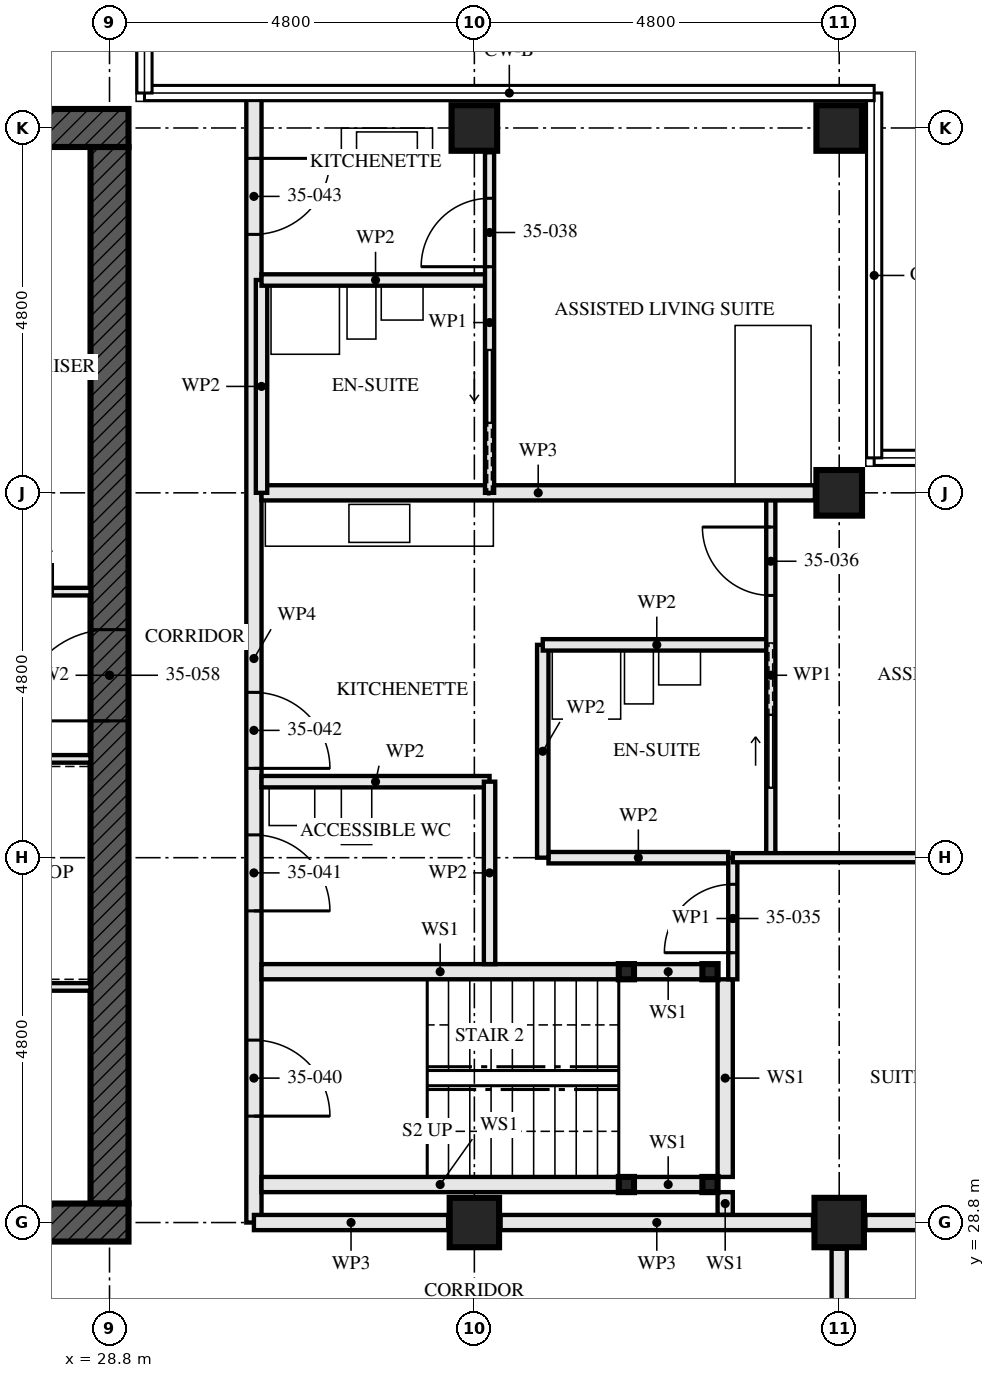
"""IFC4 building model, lengths in metres.
Left out: names, types, materials, properties, quantities, classifications, styles, units other than length and angle.
Written with IfcOpenShell. Run it as: python <this file> out.ifc"""

import sys

from ifc_helpers import new_model, si_unit, direction, frame, frame_2d, origin, origin_2d, place, context, subcontext, project, spatial, rectangle, hollow_rectangle, extrude, element, fill, save


model = new_model("IFC4")
c1 = context("Model", 3, precision=1e-05, world=origin(), true_north=direction((0.0, 1.0)))
c2 = subcontext(c1, "Body", "Model", "MODEL_VIEW")
j1 = project(units=[si_unit("LENGTHUNIT", "METRE"), si_unit("PLANEANGLEUNIT", "RADIAN")], contexts=[c1])
p1 = place(None, origin())
s1 = spatial("IfcSite", under=j1, at=p1, CompositionType="ELEMENT")
p2 = place(p1, origin())
s2 = spatial("IfcBuilding", under=s1, at=p2, CompositionType="ELEMENT")
p3 = place(p2, frame((0.0, 0.0, 129.5)))
s3 = spatial("IfcBuildingStorey", under=s2, at=p3, CompositionType="ELEMENT", Elevation=129.5)
p4 = place(p3, frame((33.6, 28.8, 0.0), z_axis=(0.0, 0.0, 1.0), x_axis=(0.0, 1.0, 0.0)))
e1 = element("IfcColumn", 1, at=p4, inside=s3, PredefinedType="COLUMN", context=c2, shape_type="SweptSolid", body=[
    extrude(hollow_rectangle(XDim=0.65, YDim=0.65, WallThickness=0.05, at=origin_2d()), origin(), (0.0, 0.0, 1.0), 3.5),
])
p5 = place(p3, frame((33.6, 43.2, 0.0), z_axis=(0.0, 0.0, 1.0), x_axis=(0.0, 1.0, 0.0)))
e2 = element("IfcColumn", 2, at=p5, inside=s3, PredefinedType="COLUMN", context=c2, shape_type="SweptSolid", body=[
    extrude(hollow_rectangle(XDim=0.6, YDim=0.6, WallThickness=0.08, at=origin_2d()), origin(), (0.0, 0.0, 1.0), 3.5),
])
p6 = place(p3, frame((38.4, 28.8, 0.0), z_axis=(0.0, 0.0, 1.0), x_axis=(0.0, 1.0, 0.0)))
e3 = element("IfcColumn", 3, at=p6, inside=s3, PredefinedType="COLUMN", context=c2, shape_type="SweptSolid", body=[
    extrude(hollow_rectangle(XDim=0.65, YDim=0.65, WallThickness=0.05, at=origin_2d()), origin(), (0.0, 0.0, 1.0), 3.5),
])
for number, where, z_axis, x_axis in (
    (4, (38.4, 38.4, 0.0), (0.0, 0.0, 1.0), (0.0, 1.0, 0.0)),
    (5, (38.4, 43.2, 0.0), (0.0, 0.0, 1.0), (0.0, 1.0, 0.0)),
):
    element("IfcColumn", number, at=place(p3, frame(where, z_axis=z_axis, x_axis=x_axis)), inside=s3, PredefinedType="COLUMN", context=c2, shape_type="SweptSolid", body=[
        extrude(hollow_rectangle(XDim=0.6, YDim=0.6, WallThickness=0.08, at=origin_2d()), origin(), (0.0, 0.0, 1.0), 3.5),
    ])
p7 = place(p3, frame((14.15, 28.8, -0.17), z_axis=(0.0, 0.0, 1.0), x_axis=(1.0, 0.0, 0.0)))
e6 = element("IfcWall", 6, at=p7, inside=s3, PredefinedType="SHEAR", context=c2, shape_type="SweptSolid", body=[
    extrude(rectangle(XDim=14.9, YDim=0.5, at=frame_2d((7.45, 0.0))), origin(), (0.0, 0.0, 1.0), 3.5),
])
p8 = place(p7, frame((6.85, 0.0, 0.17)))
e7 = element("IfcOpeningElement", 7, at=p8, cuts=e6, PredefinedType="OPENING", context=c2, shape_type="SweptSolid", body=[
    extrude(rectangle(XDim=1.2, YDim=2.1, at=frame_2d((0.6, 1.05))), frame((0.0, 0.26, 0.0), z_axis=(0.0, -1.0, 0.0), x_axis=(1.0, 0.0, 0.0)), (0.0, 0.0, 1.0), 0.521),
])
p9 = place(p3, frame((29.05, 43.2, -0.17), z_axis=(0.0, 0.0, 1.0), x_axis=(-1.0, 0.0, 0.0)))
e8 = element("IfcWall", 8, at=p9, inside=s3, PredefinedType="SHEAR", context=c2, shape_type="SweptSolid", body=[
    extrude(rectangle(XDim=14.9, YDim=0.5, at=frame_2d((7.45, 0.0))), origin(), (0.0, 0.0, 1.0), 3.5),
])
p10 = place(p9, frame((6.85, 0.0, 0.17)))
e9 = element("IfcOpeningElement", 9, at=p10, cuts=e8, PredefinedType="OPENING", context=c2, shape_type="SweptSolid", body=[
    extrude(rectangle(XDim=1.2, YDim=2.1, at=frame_2d((0.6, 1.05))), frame((0.0, 0.26, 0.0), z_axis=(0.0, -1.0, 0.0), x_axis=(1.0, 0.0, 0.0)), (0.0, 0.0, 1.0), 0.521),
])
p11 = place(p3, frame((28.8, 29.05, -0.17), z_axis=(0.0, 0.0, 1.0), x_axis=(0.0, 1.0, 0.0)))
e10 = element("IfcWall", 10, at=p11, inside=s3, PredefinedType="SHEAR", context=c2, shape_type="SweptSolid", body=[
    extrude(rectangle(XDim=13.9, YDim=0.5, at=frame_2d((6.95, 0.0))), origin(), (0.0, 0.0, 1.0), 3.5),
])
p12 = place(p11, frame((6.35, 0.0, 0.17)))
e11 = element("IfcOpeningElement", 11, at=p12, cuts=e10, PredefinedType="OPENING", context=c2, shape_type="SweptSolid", body=[
    extrude(rectangle(XDim=1.2, YDim=2.1, at=frame_2d((0.6, 1.05))), frame((0.0, 0.26, 0.0), z_axis=(0.0, -1.0, 0.0), x_axis=(1.0, 0.0, 0.0)), (0.0, 0.0, 1.0), 0.521),
])
for number, where, z_axis, x_axis in (
    (12, (36.7, 29.3, 0.0), (0.0, 0.0, 1.0), (1.0, 0.0, 0.0)),
    (13, (36.7, 32.1, 0.0), (0.0, 0.0, 1.0), (1.0, 0.0, 0.0)),
    (14, (35.6, 29.3, 0.0), (0.0, 0.0, 1.0), (1.0, 0.0, 0.0)),
    (15, (35.6, 32.1, 0.0), (0.0, 0.0, 1.0), (1.0, 0.0, 0.0)),
):
    element("IfcColumn", number, at=place(p3, frame(where, z_axis=z_axis, x_axis=x_axis)), inside=s3, PredefinedType="COLUMN", context=c2, shape_type="SweptSolid", body=[
        extrude(hollow_rectangle(XDim=0.2, YDim=0.2, WallThickness=0.008, at=origin_2d()), origin(), (0.0, 0.0, 1.0), 3.33),
    ])
p13 = place(p3, frame((38.4, 26.8, 0.0), z_axis=(0.0, 0.0, 1.0), x_axis=(0.0, 1.0, 0.0)))
e16 = element("IfcWall", 16, at=p13, inside=s3, PredefinedType="PARTITIONING", context=c2, shape_type="SweptSolid", body=[
    extrude(rectangle(XDim=1.655, YDim=0.2, at=frame_2d((0.828, 0.0))), origin(), (0.0, 0.0, 1.0), 3.33),
])
p14 = place(p3, frame((36.6, 29.3, 0.0), z_axis=(0.0, 0.0, 1.0), x_axis=(-1.0, 0.0, 0.0)))
e17 = element("IfcWall", 17, at=p14, inside=s3, PredefinedType="SOLIDWALL", context=c2, shape_type="SweptSolid", body=[
    extrude(rectangle(XDim=0.9, YDim=0.2, at=frame_2d((0.45, 0.0))), origin(), (0.0, 0.0, 1.0), 2.99),
])
p15 = place(p3, frame((35.5, 29.3, 0.0), z_axis=(0.0, 0.0, 1.0), x_axis=(-1.0, 0.0, 0.0)))
e18 = element("IfcWall", 18, at=p15, inside=s3, PredefinedType="SOLIDWALL", context=c2, shape_type="SweptSolid", body=[
    extrude(rectangle(XDim=4.7, YDim=0.2, at=frame_2d((2.35, 0.0))), origin(), (0.0, 0.0, 1.0), 2.99),
])
p16 = place(p3, frame((36.6, 32.1, 0.0), z_axis=(0.0, 0.0, 1.0), x_axis=(-1.0, 0.0, 0.0)))
e19 = element("IfcWall", 19, at=p16, inside=s3, PredefinedType="SOLIDWALL", context=c2, shape_type="SweptSolid", body=[
    extrude(rectangle(XDim=0.9, YDim=0.2, at=frame_2d((0.45, 0.0))), origin(), (0.0, 0.0, 1.0), 2.99),
])
p17 = place(p3, frame((35.5, 32.1, 0.0), z_axis=(0.0, 0.0, 1.0), x_axis=(-1.0, 0.0, 0.0)))
e20 = element("IfcWall", 20, at=p17, inside=s3, PredefinedType="SOLIDWALL", context=c2, shape_type="SweptSolid", body=[
    extrude(rectangle(XDim=4.7, YDim=0.2, at=frame_2d((2.35, 0.0))), origin(), (0.0, 0.0, 1.0), 2.99),
])
p18 = place(p3, frame((36.9, 28.9, 0.0), z_axis=(0.0, 0.0, 1.0), x_axis=(0.0, 1.0, 0.0)))
e21 = element("IfcWall", 21, at=p18, inside=s3, PredefinedType="SOLIDWALL", context=c2, shape_type="SweptSolid", body=[
    extrude(rectangle(XDim=0.3, YDim=0.2, at=frame_2d((0.15, 0.0))), origin(), (0.0, 0.0, 1.0), 3.33),
])
p19 = place(p3, frame((36.9, 29.4, 0.0), z_axis=(0.0, 0.0, 1.0), x_axis=(0.0, 1.0, 0.0)))
e22 = element("IfcWall", 22, at=p19, inside=s3, PredefinedType="SOLIDWALL", context=c2, shape_type="SweptSolid", body=[
    extrude(rectangle(XDim=2.6, YDim=0.2, at=frame_2d((1.3, 0.0))), origin(), (0.0, 0.0, 1.0), 3.33),
])
p20 = place(p3, frame((33.8, 32.2, 0.0), z_axis=(0.0, 0.0, 1.0), x_axis=(0.0, 1.0, 0.0)))
e23 = element("IfcWall", 23, at=p20, inside=s3, PredefinedType="PARTITIONING", context=c2, shape_type="SweptSolid", body=[
    extrude(rectangle(XDim=2.4, YDim=0.15, at=frame_2d((1.2, 0.0))), origin(), (0.0, 0.0, 1.0), 2.55),
])
for number, where, z_axis, x_axis in (
    (24, (33.8, 34.6, 0.0), (0.0, 0.0, 1.0), (-1.0, 0.0, 0.0)),
    (25, (37.5, 36.4, 0.0), (0.0, 0.0, 1.0), (-1.0, 0.0, 0.0)),
):
    element("IfcWall", number, at=place(p3, frame(where, z_axis=z_axis, x_axis=x_axis)), inside=s3, PredefinedType="PARTITIONING", context=c2, shape_type="SweptSolid", body=[
        extrude(rectangle(XDim=3.0, YDim=0.15, at=frame_2d((1.5, 0.0))), origin(), (0.0, 0.0, 1.0), 3.33),
    ])
p21 = place(p3, frame((34.5, 33.6, 0.0), z_axis=(0.0, 0.0, 1.0), x_axis=(0.0, 1.0, 0.0)))
e26 = element("IfcWall", 26, at=p21, inside=s3, PredefinedType="PARTITIONING", context=c2, shape_type="SweptSolid", body=[
    extrude(rectangle(XDim=2.8, YDim=0.15, at=frame_2d((1.4, 0.0))), origin(), (0.0, 0.0, 1.0), 3.33),
])
p22 = place(p3, frame((37.0, 32.0, 0.0), z_axis=(0.0, 0.0, 1.0), x_axis=(0.0, 1.0, 0.0)))
e27 = element("IfcWall", 27, at=p22, inside=s3, PredefinedType="PARTITIONING", context=c2, shape_type="SweptSolid", body=[
    extrude(rectangle(XDim=1.6, YDim=0.12, at=frame_2d((0.8, 0.0))), origin(), (0.0, 0.0, 1.0), 3.33),
])
p23 = place(p22, frame((0.35, 0.0, 0.0)))
e28 = element("IfcOpeningElement", 28, at=p23, cuts=e27, PredefinedType="OPENING", context=c2, shape_type="SweptSolid", body=[
    extrude(rectangle(XDim=0.9, YDim=2.1, at=frame_2d((0.45, 1.05))), frame((0.0, 0.071, 0.0), z_axis=(0.0, -1.0, 0.0), x_axis=(1.0, 0.0, 0.0)), (0.0, 0.0, 1.0), 0.141),
])
p24 = place(p3, frame((37.5, 33.6, 0.0), z_axis=(0.0, 0.0, 1.0), x_axis=(0.0, 1.0, 0.0)))
e29 = element("IfcWall", 29, at=p24, inside=s3, PredefinedType="PARTITIONING", context=c2, shape_type="SweptSolid", body=[
    extrude(rectangle(XDim=4.8, YDim=0.12, at=frame_2d((2.4, 0.0))), origin(), (0.0, 0.0, 1.0), 3.33),
])
p25 = place(p24, frame((3.45, 0.0, 0.0)))
e30 = element("IfcOpeningElement", 30, at=p25, cuts=e29, PredefinedType="OPENING", context=c2, shape_type="SweptSolid", body=[
    extrude(rectangle(XDim=0.9, YDim=2.1, at=frame_2d((0.45, 1.05))), frame((0.0, 0.071, 0.0), z_axis=(0.0, -1.0, 0.0), x_axis=(1.0, 0.0, 0.0)), (0.0, 0.0, 1.0), 0.141),
])
p26 = place(p24, frame((0.925, 0.0, 0.0)))
e31 = element("IfcOpeningElement", 31, at=p26, cuts=e29, PredefinedType="OPENING", context=c2, shape_type="SweptSolid", body=[
    extrude(rectangle(XDim=0.95, YDim=2.1, at=frame_2d((0.475, 1.05))), frame((0.0, 0.071, 0.0), z_axis=(0.0, -1.0, 0.0), x_axis=(1.0, 0.0, 0.0)), (0.0, 0.0, 1.0), 0.141),
])
p27 = place(p3, frame((42.88, 33.6, 0.0), z_axis=(0.0, 0.0, 1.0), x_axis=(-1.0, 0.0, 0.0)))
e32 = element("IfcWall", 32, at=p27, inside=s3, PredefinedType="PARTITIONING", context=c2, shape_type="SweptSolid", body=[
    extrude(rectangle(XDim=5.88, YDim=0.12, at=frame_2d((2.94, 0.0))), origin(), (0.0, 0.0, 1.0), 2.55),
])
p28 = place(p3, frame((38.08, 38.4, 0.0), z_axis=(0.0, 0.0, 1.0), x_axis=(-1.0, 0.0, 0.0)))
e33 = element("IfcWall", 33, at=p28, inside=s3, PredefinedType="PARTITIONING", context=c2, shape_type="SweptSolid", body=[
    extrude(rectangle(XDim=7.28, YDim=0.2, at=frame_2d((3.64, 0.0))), origin(), (0.0, 0.0, 1.0), 2.55),
])
p29 = place(p3, frame((33.8, 41.2, 0.0), z_axis=(0.0, 0.0, 1.0), x_axis=(-1.0, 0.0, 0.0)))
e34 = element("IfcWall", 34, at=p29, inside=s3, PredefinedType="PARTITIONING", context=c2, shape_type="SweptSolid", body=[
    extrude(rectangle(XDim=3.0, YDim=0.15, at=frame_2d((1.5, 0.0))), origin(), (0.0, 0.0, 1.0), 3.33),
])
p30 = place(p3, frame((30.8, 38.4, 0.0), z_axis=(0.0, 0.0, 1.0), x_axis=(0.0, 1.0, 0.0)))
e35 = element("IfcWall", 35, at=p30, inside=s3, PredefinedType="PARTITIONING", context=c2, shape_type="SweptSolid", body=[
    extrude(rectangle(XDim=2.8, YDim=0.15, at=frame_2d((1.4, 0.0))), origin(), (0.0, 0.0, 1.0), 3.33),
])
p31 = place(p3, frame((33.8, 38.4, 0.0), z_axis=(0.0, 0.0, 1.0), x_axis=(0.0, 1.0, 0.0)))
e36 = element("IfcWall", 36, at=p31, inside=s3, PredefinedType="PARTITIONING", context=c2, shape_type="SweptSolid", body=[
    extrude(rectangle(XDim=4.48, YDim=0.12, at=frame_2d((2.24, 0.0))), origin(), (0.0, 0.0, 1.0), 3.33),
])
p32 = place(p31, frame((2.975, 0.0, 0.0)))
e37 = element("IfcOpeningElement", 37, at=p32, cuts=e36, PredefinedType="OPENING", context=c2, shape_type="SweptSolid", body=[
    extrude(rectangle(XDim=0.9, YDim=2.1, at=frame_2d((0.45, 1.05))), frame((0.0, 0.071, 0.0), z_axis=(0.0, -1.0, 0.0), x_axis=(1.0, 0.0, 0.0)), (0.0, 0.0, 1.0), 0.141),
])
p33 = place(p31, frame((0.925, 0.0, 0.0)))
e38 = element("IfcOpeningElement", 38, at=p33, cuts=e36, PredefinedType="OPENING", context=c2, shape_type="SweptSolid", body=[
    extrude(rectangle(XDim=0.95, YDim=2.1, at=frame_2d((0.475, 1.05))), frame((0.0, 0.071, 0.0), z_axis=(0.0, -1.0, 0.0), x_axis=(1.0, 0.0, 0.0)), (0.0, 0.0, 1.0), 0.141),
])
p34 = place(p3, frame((30.7, 28.8, 0.0), z_axis=(0.0, 0.0, 1.0), x_axis=(0.0, 1.0, 0.0)))
e39 = element("IfcWall", 39, at=p34, inside=s3, PredefinedType="PARTITIONING", context=c2, shape_type="SweptSolid", body=[
    extrude(rectangle(XDim=14.84, YDim=0.2, at=frame_2d((7.42, 0.0))), origin(), (0.0, 0.0, 1.0), 2.32),
])
p35 = place(p34, frame((1.4, 0.0, 0.0)))
e40 = element("IfcOpeningElement", 40, at=p35, cuts=e39, PredefinedType="OPENING", context=c2, shape_type="SweptSolid", body=[
    extrude(rectangle(XDim=1.0, YDim=2.1, at=frame_2d((0.5, 1.05))), frame((0.0, 0.111, 0.0), z_axis=(0.0, -1.0, 0.0), x_axis=(1.0, 0.0, 0.0)), (0.0, 0.0, 1.0), 0.221),
])
p36 = place(p34, frame((4.1, 0.0, 0.0)))
e41 = element("IfcOpeningElement", 41, at=p36, cuts=e39, PredefinedType="OPENING", context=c2, shape_type="SweptSolid", body=[
    extrude(rectangle(XDim=1.0, YDim=2.1, at=frame_2d((0.5, 1.05))), frame((0.0, 0.111, 0.0), z_axis=(0.0, -1.0, 0.0), x_axis=(1.0, 0.0, 0.0)), (0.0, 0.0, 1.0), 0.221),
])
p37 = place(p34, frame((5.975, 0.0, 0.0)))
e42 = element("IfcOpeningElement", 42, at=p37, cuts=e39, PredefinedType="OPENING", context=c2, shape_type="SweptSolid", body=[
    extrude(rectangle(XDim=1.0, YDim=2.1, at=frame_2d((0.5, 1.05))), frame((0.0, 0.111, 0.0), z_axis=(0.0, -1.0, 0.0), x_axis=(1.0, 0.0, 0.0)), (0.0, 0.0, 1.0), 0.221),
])
p38 = place(p34, frame((13.0, 0.0, 0.0)))
e43 = element("IfcOpeningElement", 43, at=p38, cuts=e39, PredefinedType="OPENING", context=c2, shape_type="SweptSolid", body=[
    extrude(rectangle(XDim=1.0, YDim=2.1, at=frame_2d((0.5, 1.05))), frame((0.0, 0.111, 0.0), z_axis=(0.0, -1.0, 0.0), x_axis=(1.0, 0.0, 0.0)), (0.0, 0.0, 1.0), 0.221),
])
p39 = place(p3, frame((23.05, 34.9, 0.0), z_axis=(0.0, 0.0, 1.0), x_axis=(1.0, 0.0, 0.0)))
e44 = element("IfcWall", 44, at=p39, inside=s3, PredefinedType="SOLIDWALL", context=c2, shape_type="SweptSolid", body=[
    extrude(rectangle(XDim=5.5, YDim=0.1, at=frame_2d((2.75, 0.0))), origin(), (0.0, 0.0, 1.0), 3.33),
])
p40 = place(p3, frame((22.65, 37.1, 0.0), z_axis=(0.0, 0.0, 1.0), x_axis=(1.0, 0.0, 0.0)))
e45 = element("IfcWall", 45, at=p40, inside=s3, PredefinedType="SOLIDWALL", context=c2, shape_type="SweptSolid", body=[
    extrude(rectangle(XDim=5.9, YDim=0.1, at=frame_2d((2.95, 0.0))), origin(), (0.0, 0.0, 1.0), 3.33),
])
p41 = place(p40, frame((3.15, 0.0, 0.0)))
e46 = element("IfcOpeningElement", 46, at=p41, cuts=e45, PredefinedType="OPENING", context=c2, shape_type="SweptSolid", body=[
    extrude(rectangle(XDim=0.9, YDim=2.1, at=frame_2d((0.45, 1.05))), frame((0.0, 0.061, 0.0), z_axis=(0.0, -1.0, 0.0), x_axis=(1.0, 0.0, 0.0)), (0.0, 0.0, 1.0), 0.121),
])
p42 = place(p40, frame((4.7, 0.0, 0.0)))
e47 = element("IfcOpeningElement", 47, at=p42, cuts=e45, PredefinedType="OPENING", context=c2, shape_type="SweptSolid", body=[
    extrude(rectangle(XDim=0.7, YDim=2.1, at=frame_2d((0.35, 1.05))), frame((0.0, 0.061, 0.0), z_axis=(0.0, -1.0, 0.0), x_axis=(1.0, 0.0, 0.0)), (0.0, 0.0, 1.0), 0.121),
])
p43 = place(p3, frame((23.15, 31.9, 0.0), z_axis=(0.0, 0.0, 1.0), x_axis=(1.0, 0.0, 0.0)))
e48 = element("IfcWall", 48, at=p43, inside=s3, PredefinedType="SOLIDWALL", context=c2, shape_type="SweptSolid", body=[
    extrude(rectangle(XDim=5.4, YDim=0.1, at=frame_2d((2.7, 0.0))), origin(), (0.0, 0.0, 1.0), 3.33),
])
p44 = place(p3, frame((42.88, 28.8, 0.0), z_axis=(0.0, 0.0, 1.0), x_axis=(-1.0, 0.0, 0.0)))
e49 = element("IfcWall", 49, at=p44, inside=s3, PredefinedType="PARTITIONING", context=c2, shape_type="SweptSolid", body=[
    extrude(rectangle(XDim=4.135, YDim=0.2, at=frame_2d((2.067, 0.0))), origin(), (0.0, 0.0, 1.0), 2.32),
])
p45 = place(p3, frame((38.055, 28.8, 0.0), z_axis=(0.0, 0.0, 1.0), x_axis=(-1.0, 0.0, 0.0)))
e50 = element("IfcWall", 50, at=p45, inside=s3, PredefinedType="PARTITIONING", context=c2, shape_type="SweptSolid", body=[
    extrude(rectangle(XDim=4.11, YDim=0.2, at=frame_2d((2.055, 0.0))), origin(), (0.0, 0.0, 1.0), 2.32),
])
p46 = place(p3, frame((33.255, 28.8, 0.0), z_axis=(0.0, 0.0, 1.0), x_axis=(-1.0, 0.0, 0.0)))
e51 = element("IfcWall", 51, at=p46, inside=s3, PredefinedType="PARTITIONING", context=c2, shape_type="SweptSolid", body=[
    extrude(rectangle(XDim=2.555, YDim=0.2, at=frame_2d((1.277, 0.0))), origin(), (0.0, 0.0, 1.0), 2.32),
])
p47 = place(p3, frame((36.94, 33.6, 0.0), z_axis=(0.0, 0.0, 1.0), x_axis=(-1.0, 0.0, 0.0)))
e52 = element("IfcWall", 52, at=p47, inside=s3, PredefinedType="PARTITIONING", context=c2, shape_type="SweptSolid", body=[
    extrude(rectangle(XDim=2.365, YDim=0.15, at=frame_2d((1.183, 0.0))), origin(), (0.0, 0.0, 1.0), 2.55),
])
p48 = place(p23, origin())
e53 = element("IfcDoor", 53, at=p48, inside=s3, OperationType="SINGLE_SWING_RIGHT", PredefinedType="DOOR", context=c2, shape_type="SweptSolid", body=[
    extrude(rectangle(XDim=0.9, YDim=2.1, at=frame_2d((0.45, 1.05))), frame((0.0, 0.022, 0.0), z_axis=(0.0, -1.0, 0.0), x_axis=(1.0, 0.0, 0.0)), (0.0, 0.0, 1.0), 0.044),
])
fill(e28, e53)
p49 = place(p25, origin())
e54 = element("IfcDoor", 54, at=p49, inside=s3, OperationType="SINGLE_SWING_LEFT", PredefinedType="DOOR", context=c2, shape_type="SweptSolid", body=[
    extrude(rectangle(XDim=0.9, YDim=2.1, at=frame_2d((0.45, 1.05))), frame((0.0, 0.022, 0.0), z_axis=(0.0, -1.0, 0.0), x_axis=(1.0, 0.0, 0.0)), (0.0, 0.0, 1.0), 0.044),
])
fill(e30, e54)
p50 = place(p26, origin())
e55 = element("IfcDoor", 55, at=p50, inside=s3, OperationType="SLIDING_TO_LEFT", PredefinedType="DOOR", context=c2, shape_type="SweptSolid", body=[
    extrude(rectangle(XDim=0.95, YDim=2.1, at=frame_2d((0.475, 1.05))), frame((0.0, 0.022, 0.0), z_axis=(0.0, -1.0, 0.0), x_axis=(1.0, 0.0, 0.0)), (0.0, 0.0, 1.0), 0.044),
])
fill(e31, e55)
p51 = place(p32, origin())
e56 = element("IfcDoor", 56, at=p51, inside=s3, OperationType="SINGLE_SWING_RIGHT", PredefinedType="DOOR", context=c2, shape_type="SweptSolid", body=[
    extrude(rectangle(XDim=0.9, YDim=2.1, at=frame_2d((0.45, 1.05))), frame((0.0, 0.022, 0.0), z_axis=(0.0, -1.0, 0.0), x_axis=(1.0, 0.0, 0.0)), (0.0, 0.0, 1.0), 0.044),
])
fill(e37, e56)
p52 = place(p33, origin())
e57 = element("IfcDoor", 57, at=p52, inside=s3, OperationType="SLIDING_TO_RIGHT", PredefinedType="DOOR", context=c2, shape_type="SweptSolid", body=[
    extrude(rectangle(XDim=0.95, YDim=2.1, at=frame_2d((0.475, 1.05))), frame((0.0, 0.022, 0.0), z_axis=(0.0, -1.0, 0.0), x_axis=(1.0, 0.0, 0.0)), (0.0, 0.0, 1.0), 0.044),
])
fill(e38, e57)
p53 = place(p35, frame((1.0, 0.0, 0.0), z_axis=(0.0, 0.0, 1.0), x_axis=(-1.0, 0.0, 0.0)))
e58 = element("IfcDoor", 58, at=p53, inside=s3, OperationType="SINGLE_SWING_LEFT", PredefinedType="DOOR", context=c2, shape_type="SweptSolid", body=[
    extrude(rectangle(XDim=1.0, YDim=2.1, at=frame_2d((0.5, 1.05))), frame((0.0, 0.032, 0.0), z_axis=(0.0, -1.0, 0.0), x_axis=(1.0, 0.0, 0.0)), (0.0, 0.0, 1.0), 0.064),
])
fill(e40, e58)
p54 = place(p36, frame((1.0, 0.0, 0.0), z_axis=(0.0, 0.0, 1.0), x_axis=(-1.0, 0.0, 0.0)))
e59 = element("IfcDoor", 59, at=p54, inside=s3, OperationType="SINGLE_SWING_LEFT", PredefinedType="DOOR", context=c2, shape_type="SweptSolid", body=[
    extrude(rectangle(XDim=1.0, YDim=2.1, at=frame_2d((0.5, 1.05))), frame((0.0, 0.027, 0.0), z_axis=(0.0, -1.0, 0.0), x_axis=(1.0, 0.0, 0.0)), (0.0, 0.0, 1.0), 0.054),
])
fill(e41, e59)
p55 = place(p37, frame((1.0, 0.0, 0.0), z_axis=(0.0, 0.0, 1.0), x_axis=(-1.0, 0.0, 0.0)))
e60 = element("IfcDoor", 60, at=p55, inside=s3, OperationType="SINGLE_SWING_LEFT", PredefinedType="DOOR", context=c2, shape_type="SweptSolid", body=[
    extrude(rectangle(XDim=1.0, YDim=2.1, at=frame_2d((0.5, 1.05))), frame((0.0, 0.027, 0.0), z_axis=(0.0, -1.0, 0.0), x_axis=(1.0, 0.0, 0.0)), (0.0, 0.0, 1.0), 0.054),
])
fill(e42, e60)
p56 = place(p38, frame((1.0, 0.0, 0.0), z_axis=(0.0, 0.0, 1.0), x_axis=(-1.0, 0.0, 0.0)))
e61 = element("IfcDoor", 61, at=p56, inside=s3, OperationType="SINGLE_SWING_RIGHT", PredefinedType="DOOR", context=c2, shape_type="SweptSolid", body=[
    extrude(rectangle(XDim=1.0, YDim=2.1, at=frame_2d((0.5, 1.05))), frame((0.0, 0.027, 0.0), z_axis=(0.0, -1.0, 0.0), x_axis=(1.0, 0.0, 0.0)), (0.0, 0.0, 1.0), 0.054),
])
fill(e43, e61)
p57 = place(p12, origin())
e62 = element("IfcDoor", 62, at=p57, inside=s3, OperationType="SINGLE_SWING_LEFT", PredefinedType="DOOR", context=c2, shape_type="SweptSolid", body=[
    extrude(rectangle(XDim=1.2, YDim=2.1, at=frame_2d((0.6, 1.05))), frame((0.0, 0.027, 0.0), z_axis=(0.0, -1.0, 0.0), x_axis=(1.0, 0.0, 0.0)), (0.0, 0.0, 1.0), 0.054),
])
fill(e11, e62)
save(model, sys.argv[1])
